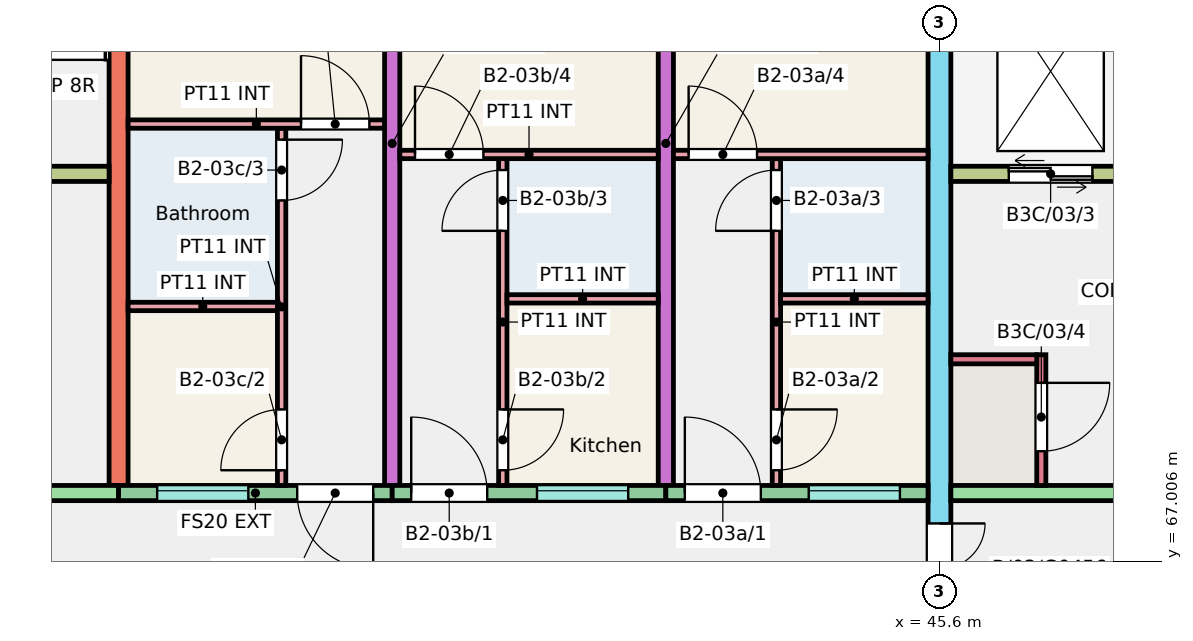
"""IFC4 building model, lengths in metres.
Left out: names, types, materials, properties, quantities, classifications, styles, units other than length and angle.
Written with IfcOpenShell. Run it as: python <this file> out.ifc"""

import sys

from ifc_helpers import new_model, si_unit, direction, frame, frame_2d, origin, place, context, subcontext, project, spatial, rectangle, extrude, element, fill, save


model = new_model("IFC4")
c1 = context("Model", 3, precision=1e-05, world=origin(), true_north=direction((0.0, 1.0)))
c2 = subcontext(c1, "Body", "Model", "MODEL_VIEW")
j1 = project(units=[si_unit("LENGTHUNIT", "METRE"), si_unit("PLANEANGLEUNIT", "RADIAN")], contexts=[c1])
p1 = place(None, origin())
s1 = spatial("IfcSite", under=j1, at=p1, CompositionType="ELEMENT")
p2 = place(p1, origin())
s2 = spatial("IfcBuilding", under=s1, at=p2, CompositionType="ELEMENT")
p3 = place(p2, frame((0.0, 0.0, 9.0)))
s3 = spatial("IfcBuildingStorey", under=s2, at=p3, CompositionType="ELEMENT", Elevation=9.0)
p4 = place(p3, frame((34.8, 68.0, 0.0), z_axis=(0.0, 0.0, 1.0), x_axis=(0.0, 1.0, 0.0)))
e1 = element("IfcWall", 1, at=p4, inside=s3, PredefinedType="SHEAR", context=c2, shape_type="SweptSolid", body=[
    extrude(rectangle(XDim=9.0, YDim=0.25, at=frame_2d((4.5, 0.0))), origin(), (0.0, 0.0, 1.0), 3.0),
])
for number, where, z_axis, x_axis in (
    (2, (38.4, 68.0, 0.0), (0.0, 0.0, 1.0), (0.0, 1.0, 0.0)),
    (3, (42.0, 68.0, 0.0), (0.0, 0.0, 1.0), (0.0, 1.0, 0.0)),
):
    element("IfcWall", number, at=place(p3, frame(where, z_axis=z_axis, x_axis=x_axis)), inside=s3, PredefinedType="SHEAR", context=c2, shape_type="SweptSolid", body=[
        extrude(rectangle(XDim=9.0, YDim=0.2, at=frame_2d((4.5, 0.0))), origin(), (0.0, 0.0, 1.0), 3.0),
    ])
p5 = place(p3, frame((45.6, 66.0, 0.0), z_axis=(0.0, 0.0, 1.0), x_axis=(0.0, 1.0, 0.0)))
e4 = element("IfcWall", 4, at=p5, inside=s3, PredefinedType="SHEAR", context=c2, shape_type="SweptSolid", body=[
    extrude(rectangle(XDim=11.0, YDim=0.3, at=frame_2d((5.5, 0.0))), origin(), (0.0, 0.0, 1.0), 3.0),
])
p6 = place(p5, frame((0.3, 0.0, 0.0)))
e5 = element("IfcOpeningElement", 5, at=p6, cuts=e4, PredefinedType="OPENING", context=c2, shape_type="SweptSolid", body=[
    extrude(rectangle(XDim=1.2, YDim=2.1, at=frame_2d((0.6, 1.05))), frame((0.0, 0.16, 0.0), z_axis=(0.0, -1.0, 0.0), x_axis=(1.0, 0.0, 0.0)), (0.0, 0.0, 1.0), 0.32),
])
p7 = place(p3, frame((28.95, 67.9, 0.0), z_axis=(0.0, 0.0, 1.0), x_axis=(1.0, 0.0, 0.0)))
e6 = element("IfcWall", 6, at=p7, inside=s3, PredefinedType="SHEAR", context=c2, shape_type="SweptSolid", body=[
    extrude(rectangle(XDim=5.85, YDim=0.2, at=frame_2d((2.925, 0.0))), origin(), (0.0, 0.0, 1.0), 3.0),
])
p8 = place(p7, frame((2.312, 0.0, 0.0)))
e7 = element("IfcOpeningElement", 7, at=p8, cuts=e6, PredefinedType="OPENING", context=c2, shape_type="SweptSolid", body=[
    extrude(rectangle(XDim=1.1, YDim=2.1, at=frame_2d((0.55, 1.05))), frame((0.0, 0.11, 0.0), z_axis=(0.0, -1.0, 0.0), x_axis=(1.0, 0.0, 0.0)), (0.0, 0.0, 1.0), 0.22),
])
p9 = place(p3, frame((28.95, 72.1, 0.0), z_axis=(0.0, 0.0, 1.0), x_axis=(1.0, 0.0, 0.0)))
e8 = element("IfcWall", 8, at=p9, inside=s3, PredefinedType="SHEAR", context=c2, shape_type="SweptSolid", body=[
    extrude(rectangle(XDim=5.725, YDim=0.2, at=frame_2d((2.863, 0.0))), origin(), (0.0, 0.0, 1.0), 3.0),
])
p10 = place(p9, frame((3.775, 0.0, 0.0)))
e9 = element("IfcOpeningElement", 9, at=p10, cuts=e8, PredefinedType="OPENING", context=c2, shape_type="SweptSolid", body=[
    extrude(rectangle(XDim=1.0, YDim=2.1, at=frame_2d((0.5, 1.05))), frame((0.0, 0.11, 0.0), z_axis=(0.0, -1.0, 0.0), x_axis=(1.0, 0.0, 0.0)), (0.0, 0.0, 1.0), 0.22),
])
p11 = place(p9, frame((0.762, 0.0, 0.0)))
e10 = element("IfcOpeningElement", 10, at=p11, cuts=e8, PredefinedType="OPENING", context=c2, shape_type="SweptSolid", body=[
    extrude(rectangle(XDim=1.1, YDim=2.1, at=frame_2d((0.55, 1.05))), frame((0.0, 0.11, 0.0), z_axis=(0.0, -1.0, 0.0), x_axis=(1.0, 0.0, 0.0)), (0.0, 0.0, 1.0), 0.22),
])
p12 = place(p3, frame((34.8, 67.9, 0.0), z_axis=(0.0, 0.0, 1.0), x_axis=(1.0, 0.0, 0.0)))
e11 = element("IfcWall", 11, at=p12, inside=s3, PredefinedType="SOLIDWALL", context=c2, shape_type="SweptSolid", body=[
    extrude(rectangle(XDim=3.6, YDim=0.2, at=frame_2d((1.8, 0.0))), origin(), (0.0, 0.0, 1.0), 3.0),
])
p13 = place(p12, frame((0.508, 0.0, 1.1)))
e12 = element("IfcOpeningElement", 12, at=p13, cuts=e11, PredefinedType="OPENING", context=c2, shape_type="SweptSolid", body=[
    extrude(rectangle(XDim=1.2, YDim=1.3, at=frame_2d((0.6, 0.65))), frame((0.0, 0.11, 0.0), z_axis=(0.0, -1.0, 0.0), x_axis=(1.0, 0.0, 0.0)), (0.0, 0.0, 1.0), 0.22),
])
p14 = place(p12, frame((2.35, 0.0, 0.0)))
e13 = element("IfcOpeningElement", 13, at=p14, cuts=e11, PredefinedType="OPENING", context=c2, shape_type="SweptSolid", body=[
    extrude(rectangle(XDim=1.0, YDim=2.1, at=frame_2d((0.5, 1.05))), frame((0.0, 0.11, 0.0), z_axis=(0.0, -1.0, 0.0), x_axis=(1.0, 0.0, 0.0)), (0.0, 0.0, 1.0), 0.22),
])
p15 = place(p3, frame((38.4, 67.9, 0.0), z_axis=(0.0, 0.0, 1.0), x_axis=(1.0, 0.0, 0.0)))
e14 = element("IfcWall", 14, at=p15, inside=s3, PredefinedType="SOLIDWALL", context=c2, shape_type="SweptSolid", body=[
    extrude(rectangle(XDim=3.6, YDim=0.2, at=frame_2d((1.8, 0.0))), origin(), (0.0, 0.0, 1.0), 3.0),
])
p16 = place(p15, frame((1.905, 0.0, 1.1)))
e15 = element("IfcOpeningElement", 15, at=p16, cuts=e14, PredefinedType="OPENING", context=c2, shape_type="SweptSolid", body=[
    extrude(rectangle(XDim=1.2, YDim=1.3, at=frame_2d((0.6, 0.65))), frame((0.0, 0.11, 0.0), z_axis=(0.0, -1.0, 0.0), x_axis=(1.0, 0.0, 0.0)), (0.0, 0.0, 1.0), 0.22),
])
p17 = place(p15, frame((0.25, 0.0, 0.0)))
e16 = element("IfcOpeningElement", 16, at=p17, cuts=e14, PredefinedType="OPENING", context=c2, shape_type="SweptSolid", body=[
    extrude(rectangle(XDim=1.0, YDim=2.1, at=frame_2d((0.5, 1.05))), frame((0.0, 0.11, 0.0), z_axis=(0.0, -1.0, 0.0), x_axis=(1.0, 0.0, 0.0)), (0.0, 0.0, 1.0), 0.22),
])
p18 = place(p3, frame((42.0, 67.9, 0.0), z_axis=(0.0, 0.0, 1.0), x_axis=(1.0, 0.0, 0.0)))
e17 = element("IfcWall", 17, at=p18, inside=s3, PredefinedType="SOLIDWALL", context=c2, shape_type="SweptSolid", body=[
    extrude(rectangle(XDim=3.45, YDim=0.2, at=frame_2d((1.725, 0.0))), origin(), (0.0, 0.0, 1.0), 3.0),
])
p19 = place(p18, frame((1.88, 0.0, 1.1)))
e18 = element("IfcOpeningElement", 18, at=p19, cuts=e17, PredefinedType="OPENING", context=c2, shape_type="SweptSolid", body=[
    extrude(rectangle(XDim=1.2, YDim=1.3, at=frame_2d((0.6, 0.65))), frame((0.0, 0.11, 0.0), z_axis=(0.0, -1.0, 0.0), x_axis=(1.0, 0.0, 0.0)), (0.0, 0.0, 1.0), 0.22),
])
p20 = place(p18, frame((0.25, 0.0, 0.0)))
e19 = element("IfcOpeningElement", 19, at=p20, cuts=e17, PredefinedType="OPENING", context=c2, shape_type="SweptSolid", body=[
    extrude(rectangle(XDim=1.0, YDim=2.1, at=frame_2d((0.5, 1.05))), frame((0.0, 0.11, 0.0), z_axis=(0.0, -1.0, 0.0), x_axis=(1.0, 0.0, 0.0)), (0.0, 0.0, 1.0), 0.22),
])
p21 = place(p3, frame((45.75, 67.9, 0.0), z_axis=(0.0, 0.0, 1.0), x_axis=(1.0, 0.0, 0.0)))
e20 = element("IfcWall", 20, at=p21, inside=s3, PredefinedType="SHEAR", context=c2, shape_type="SweptSolid", body=[
    extrude(rectangle(XDim=5.85, YDim=0.2, at=frame_2d((2.925, 0.0))), origin(), (0.0, 0.0, 1.0), 3.0),
])
p22 = place(p21, frame((2.312, 0.0, 0.0)))
e21 = element("IfcOpeningElement", 21, at=p22, cuts=e20, PredefinedType="OPENING", context=c2, shape_type="SweptSolid", body=[
    extrude(rectangle(XDim=1.1, YDim=2.1, at=frame_2d((0.55, 1.05))), frame((0.0, 0.11, 0.0), z_axis=(0.0, -1.0, 0.0), x_axis=(1.0, 0.0, 0.0)), (0.0, 0.0, 1.0), 0.22),
])
p23 = place(p3, frame((45.75, 72.1, 0.0), z_axis=(0.0, 0.0, 1.0), x_axis=(1.0, 0.0, 0.0)))
e22 = element("IfcWall", 22, at=p23, inside=s3, PredefinedType="SHEAR", context=c2, shape_type="SweptSolid", body=[
    extrude(rectangle(XDim=5.725, YDim=0.2, at=frame_2d((2.863, 0.0))), origin(), (0.0, 0.0, 1.0), 3.0),
])
p24 = place(p23, frame((3.775, 0.0, 0.0)))
e23 = element("IfcOpeningElement", 23, at=p24, cuts=e22, PredefinedType="OPENING", context=c2, shape_type="SweptSolid", body=[
    extrude(rectangle(XDim=1.0, YDim=2.1, at=frame_2d((0.5, 1.05))), frame((0.0, 0.11, 0.0), z_axis=(0.0, -1.0, 0.0), x_axis=(1.0, 0.0, 0.0)), (0.0, 0.0, 1.0), 0.22),
])
p25 = place(p23, frame((0.762, 0.0, 0.0)))
e24 = element("IfcOpeningElement", 24, at=p25, cuts=e22, PredefinedType="OPENING", context=c2, shape_type="SweptSolid", body=[
    extrude(rectangle(XDim=1.1, YDim=2.1, at=frame_2d((0.55, 1.05))), frame((0.0, 0.11, 0.0), z_axis=(0.0, -1.0, 0.0), x_axis=(1.0, 0.0, 0.0)), (0.0, 0.0, 1.0), 0.22),
])
p26 = place(p3, frame((46.94, 68.0, 0.0), z_axis=(0.0, 0.0, 1.0), x_axis=(0.0, 1.0, 0.0)))
e25 = element("IfcWall", 25, at=p26, inside=s3, PredefinedType="SHEAR", context=c2, shape_type="SweptSolid", body=[
    extrude(rectangle(XDim=1.72, YDim=0.12, at=frame_2d((0.86, 0.0))), origin(), (0.0, 0.0, 1.0), 3.0),
])
p27 = place(p26, frame((0.45, 0.0, 0.0)))
e26 = element("IfcOpeningElement", 26, at=p27, cuts=e25, PredefinedType="OPENING", context=c2, shape_type="SweptSolid", body=[
    extrude(rectangle(XDim=0.9, YDim=2.1, at=frame_2d((0.45, 1.05))), frame((0.0, 0.07, 0.0), z_axis=(0.0, -1.0, 0.0), x_axis=(1.0, 0.0, 0.0)), (0.0, 0.0, 1.0), 0.14),
])
p28 = place(p3, frame((45.75, 69.66, 0.0), z_axis=(0.0, 0.0, 1.0), x_axis=(1.0, 0.0, 0.0)))
e27 = element("IfcWall", 27, at=p28, inside=s3, PredefinedType="SHEAR", context=c2, shape_type="SweptSolid", body=[
    extrude(rectangle(XDim=1.13, YDim=0.12, at=frame_2d((0.565, 0.0))), origin(), (0.0, 0.0, 1.0), 3.0),
])
p29 = place(p3, frame((43.455, 68.0, 0.0), z_axis=(0.0, 0.0, 1.0), x_axis=(0.0, 1.0, 0.0)))
e28 = element("IfcWall", 28, at=p29, inside=s3, PredefinedType="PARTITIONING", context=c2, shape_type="SweptSolid", body=[
    extrude(rectangle(XDim=4.3, YDim=0.11, at=frame_2d((2.15, 0.0))), origin(), (0.0, 0.0, 1.0), 2.8),
])
p30 = place(p29, frame((0.2, 0.0, 0.0)))
e29 = element("IfcOpeningElement", 29, at=p30, cuts=e28, PredefinedType="OPENING", context=c2, shape_type="SweptSolid", body=[
    extrude(rectangle(XDim=0.8, YDim=2.1, at=frame_2d((0.4, 1.05))), frame((0.0, 0.065, 0.0), z_axis=(0.0, -1.0, 0.0), x_axis=(1.0, 0.0, 0.0)), (0.0, 0.0, 1.0), 0.13),
])
p31 = place(p29, frame((3.35, 0.0, 0.0)))
e30 = element("IfcOpeningElement", 30, at=p31, cuts=e28, PredefinedType="OPENING", context=c2, shape_type="SweptSolid", body=[
    extrude(rectangle(XDim=0.8, YDim=2.1, at=frame_2d((0.4, 1.05))), frame((0.0, 0.065, 0.0), z_axis=(0.0, -1.0, 0.0), x_axis=(1.0, 0.0, 0.0)), (0.0, 0.0, 1.0), 0.13),
])
p32 = place(p3, frame((43.51, 70.455, 0.0), z_axis=(0.0, 0.0, 1.0), x_axis=(1.0, 0.0, 0.0)))
e31 = element("IfcWall", 31, at=p32, inside=s3, PredefinedType="PARTITIONING", context=c2, shape_type="SweptSolid", body=[
    extrude(rectangle(XDim=1.94, YDim=0.11, at=frame_2d((0.97, 0.0))), origin(), (0.0, 0.0, 1.0), 2.8),
])
p33 = place(p3, frame((42.1, 72.355, 0.0), z_axis=(0.0, 0.0, 1.0), x_axis=(1.0, 0.0, 0.0)))
e32 = element("IfcWall", 32, at=p33, inside=s3, PredefinedType="PARTITIONING", context=c2, shape_type="SweptSolid", body=[
    extrude(rectangle(XDim=3.35, YDim=0.11, at=frame_2d((1.675, 0.0))), origin(), (0.0, 0.0, 1.0), 2.8),
])
p34 = place(p33, frame((0.2, 0.0, 0.0)))
e33 = element("IfcOpeningElement", 33, at=p34, cuts=e32, PredefinedType="OPENING", context=c2, shape_type="SweptSolid", body=[
    extrude(rectangle(XDim=0.9, YDim=2.1, at=frame_2d((0.45, 1.05))), frame((0.0, 0.065, 0.0), z_axis=(0.0, -1.0, 0.0), x_axis=(1.0, 0.0, 0.0)), (0.0, 0.0, 1.0), 0.13),
])
p35 = place(p3, frame((39.855, 68.0, 0.0), z_axis=(0.0, 0.0, 1.0), x_axis=(0.0, 1.0, 0.0)))
e34 = element("IfcWall", 34, at=p35, inside=s3, PredefinedType="PARTITIONING", context=c2, shape_type="SweptSolid", body=[
    extrude(rectangle(XDim=4.3, YDim=0.11, at=frame_2d((2.15, 0.0))), origin(), (0.0, 0.0, 1.0), 2.8),
])
p36 = place(p35, frame((0.2, 0.0, 0.0)))
e35 = element("IfcOpeningElement", 35, at=p36, cuts=e34, PredefinedType="OPENING", context=c2, shape_type="SweptSolid", body=[
    extrude(rectangle(XDim=0.8, YDim=2.1, at=frame_2d((0.4, 1.05))), frame((0.0, 0.065, 0.0), z_axis=(0.0, -1.0, 0.0), x_axis=(1.0, 0.0, 0.0)), (0.0, 0.0, 1.0), 0.13),
])
p37 = place(p35, frame((3.35, 0.0, 0.0)))
e36 = element("IfcOpeningElement", 36, at=p37, cuts=e34, PredefinedType="OPENING", context=c2, shape_type="SweptSolid", body=[
    extrude(rectangle(XDim=0.8, YDim=2.1, at=frame_2d((0.4, 1.05))), frame((0.0, 0.065, 0.0), z_axis=(0.0, -1.0, 0.0), x_axis=(1.0, 0.0, 0.0)), (0.0, 0.0, 1.0), 0.13),
])
p38 = place(p3, frame((39.91, 70.455, 0.0), z_axis=(0.0, 0.0, 1.0), x_axis=(1.0, 0.0, 0.0)))
e37 = element("IfcWall", 37, at=p38, inside=s3, PredefinedType="PARTITIONING", context=c2, shape_type="SweptSolid", body=[
    extrude(rectangle(XDim=1.99, YDim=0.11, at=frame_2d((0.995, 0.0))), origin(), (0.0, 0.0, 1.0), 2.8),
])
p39 = place(p3, frame((38.5, 72.355, 0.0), z_axis=(0.0, 0.0, 1.0), x_axis=(1.0, 0.0, 0.0)))
e38 = element("IfcWall", 38, at=p39, inside=s3, PredefinedType="PARTITIONING", context=c2, shape_type="SweptSolid", body=[
    extrude(rectangle(XDim=3.4, YDim=0.11, at=frame_2d((1.7, 0.0))), origin(), (0.0, 0.0, 1.0), 2.8),
])
p40 = place(p39, frame((0.2, 0.0, 0.0)))
e39 = element("IfcOpeningElement", 39, at=p40, cuts=e38, PredefinedType="OPENING", context=c2, shape_type="SweptSolid", body=[
    extrude(rectangle(XDim=0.9, YDim=2.1, at=frame_2d((0.45, 1.05))), frame((0.0, 0.065, 0.0), z_axis=(0.0, -1.0, 0.0), x_axis=(1.0, 0.0, 0.0)), (0.0, 0.0, 1.0), 0.13),
])
p41 = place(p3, frame((34.925, 70.355, 0.0), z_axis=(0.0, 0.0, 1.0), x_axis=(1.0, 0.0, 0.0)))
e40 = element("IfcWall", 40, at=p41, inside=s3, PredefinedType="PARTITIONING", context=c2, shape_type="SweptSolid", body=[
    extrude(rectangle(XDim=1.965, YDim=0.11, at=frame_2d((0.982, 0.0))), origin(), (0.0, 0.0, 1.0), 2.8),
])
p42 = place(p3, frame((36.945, 68.0, 0.0), z_axis=(0.0, 0.0, 1.0), x_axis=(0.0, 1.0, 0.0)))
e41 = element("IfcWall", 41, at=p42, inside=s3, PredefinedType="PARTITIONING", context=c2, shape_type="SweptSolid", body=[
    extrude(rectangle(XDim=4.7, YDim=0.11, at=frame_2d((2.35, 0.0))), origin(), (0.0, 0.0, 1.0), 2.8),
])
p43 = place(p42, frame((0.2, 0.0, 0.0)))
e42 = element("IfcOpeningElement", 42, at=p43, cuts=e41, PredefinedType="OPENING", context=c2, shape_type="SweptSolid", body=[
    extrude(rectangle(XDim=0.8, YDim=2.1, at=frame_2d((0.4, 1.05))), frame((0.0, 0.065, 0.0), z_axis=(0.0, -1.0, 0.0), x_axis=(1.0, 0.0, 0.0)), (0.0, 0.0, 1.0), 0.13),
])
p44 = place(p42, frame((3.75, 0.0, 0.0)))
e43 = element("IfcOpeningElement", 43, at=p44, cuts=e41, PredefinedType="OPENING", context=c2, shape_type="SweptSolid", body=[
    extrude(rectangle(XDim=0.8, YDim=2.1, at=frame_2d((0.4, 1.05))), frame((0.0, 0.065, 0.0), z_axis=(0.0, -1.0, 0.0), x_axis=(1.0, 0.0, 0.0)), (0.0, 0.0, 1.0), 0.13),
])
p45 = place(p3, frame((34.925, 72.755, 0.0), z_axis=(0.0, 0.0, 1.0), x_axis=(1.0, 0.0, 0.0)))
e44 = element("IfcWall", 44, at=p45, inside=s3, PredefinedType="PARTITIONING", context=c2, shape_type="SweptSolid", body=[
    extrude(rectangle(XDim=3.375, YDim=0.11, at=frame_2d((1.688, 0.0))), origin(), (0.0, 0.0, 1.0), 2.8),
])
p46 = place(p45, frame((2.275, 0.0, 0.0)))
e45 = element("IfcOpeningElement", 45, at=p46, cuts=e44, PredefinedType="OPENING", context=c2, shape_type="SweptSolid", body=[
    extrude(rectangle(XDim=0.9, YDim=2.1, at=frame_2d((0.45, 1.05))), frame((0.0, 0.065, 0.0), z_axis=(0.0, -1.0, 0.0), x_axis=(1.0, 0.0, 0.0)), (0.0, 0.0, 1.0), 0.13),
])
p47 = place(p19, origin())
e46 = element("IfcWindow", 46, at=p47, inside=s3, PartitioningType="SINGLE_PANEL", PredefinedType="WINDOW", context=c2, shape_type="SweptSolid", body=[
    extrude(rectangle(XDim=1.2, YDim=1.3, at=frame_2d((0.6, 0.65))), frame((0.0, 0.06, 0.0), z_axis=(0.0, -1.0, 0.0), x_axis=(1.0, 0.0, 0.0)), (0.0, 0.0, 1.0), 0.06),
])
fill(e18, e46)
p48 = place(p16, origin())
e47 = element("IfcWindow", 47, at=p48, inside=s3, PartitioningType="SINGLE_PANEL", PredefinedType="WINDOW", context=c2, shape_type="SweptSolid", body=[
    extrude(rectangle(XDim=1.2, YDim=1.3, at=frame_2d((0.6, 0.65))), frame((0.0, 0.06, 0.0), z_axis=(0.0, -1.0, 0.0), x_axis=(1.0, 0.0, 0.0)), (0.0, 0.0, 1.0), 0.06),
])
fill(e15, e47)
p49 = place(p13, origin())
e48 = element("IfcWindow", 48, at=p49, inside=s3, PartitioningType="SINGLE_PANEL", PredefinedType="WINDOW", context=c2, shape_type="SweptSolid", body=[
    extrude(rectangle(XDim=1.2, YDim=1.3, at=frame_2d((0.6, 0.65))), frame((0.0, 0.06, 0.0), z_axis=(0.0, -1.0, 0.0), x_axis=(1.0, 0.0, 0.0)), (0.0, 0.0, 1.0), 0.06),
])
fill(e12, e48)
p50 = place(p20, origin())
e49 = element("IfcDoor", 49, at=p50, inside=s3, OperationType="SINGLE_SWING_LEFT", PredefinedType="DOOR", context=c2, shape_type="SweptSolid", body=[
    extrude(rectangle(XDim=1.0, YDim=2.1, at=frame_2d((0.5, 1.05))), frame((0.0, 0.025, 0.0), z_axis=(0.0, -1.0, 0.0), x_axis=(1.0, 0.0, 0.0)), (0.0, 0.0, 1.0), 0.05),
])
fill(e19, e49)
p51 = place(p30, origin())
e50 = element("IfcDoor", 50, at=p51, inside=s3, OperationType="SINGLE_SWING_RIGHT", PredefinedType="DOOR", context=c2, shape_type="SweptSolid", body=[
    extrude(rectangle(XDim=0.8, YDim=2.1, at=frame_2d((0.4, 1.05))), frame((0.0, 0.025, 0.0), z_axis=(0.0, -1.0, 0.0), x_axis=(1.0, 0.0, 0.0)), (0.0, 0.0, 1.0), 0.05),
])
fill(e29, e50)
p52 = place(p31, origin())
e51 = element("IfcDoor", 51, at=p52, inside=s3, OperationType="SINGLE_SWING_LEFT", PredefinedType="DOOR", context=c2, shape_type="SweptSolid", body=[
    extrude(rectangle(XDim=0.8, YDim=2.1, at=frame_2d((0.4, 1.05))), frame((0.0, 0.025, 0.0), z_axis=(0.0, -1.0, 0.0), x_axis=(1.0, 0.0, 0.0)), (0.0, 0.0, 1.0), 0.05),
])
fill(e30, e51)
p53 = place(p34, origin())
e52 = element("IfcDoor", 52, at=p53, inside=s3, OperationType="SINGLE_SWING_LEFT", PredefinedType="DOOR", context=c2, shape_type="SweptSolid", body=[
    extrude(rectangle(XDim=0.9, YDim=2.1, at=frame_2d((0.45, 1.05))), frame((0.0, 0.025, 0.0), z_axis=(0.0, -1.0, 0.0), x_axis=(1.0, 0.0, 0.0)), (0.0, 0.0, 1.0), 0.05),
])
fill(e33, e52)
p54 = place(p17, origin())
e53 = element("IfcDoor", 53, at=p54, inside=s3, OperationType="SINGLE_SWING_LEFT", PredefinedType="DOOR", context=c2, shape_type="SweptSolid", body=[
    extrude(rectangle(XDim=1.0, YDim=2.1, at=frame_2d((0.5, 1.05))), frame((0.0, 0.025, 0.0), z_axis=(0.0, -1.0, 0.0), x_axis=(1.0, 0.0, 0.0)), (0.0, 0.0, 1.0), 0.05),
])
fill(e16, e53)
p55 = place(p36, origin())
e54 = element("IfcDoor", 54, at=p55, inside=s3, OperationType="SINGLE_SWING_RIGHT", PredefinedType="DOOR", context=c2, shape_type="SweptSolid", body=[
    extrude(rectangle(XDim=0.8, YDim=2.1, at=frame_2d((0.4, 1.05))), frame((0.0, 0.025, 0.0), z_axis=(0.0, -1.0, 0.0), x_axis=(1.0, 0.0, 0.0)), (0.0, 0.0, 1.0), 0.05),
])
fill(e35, e54)
p56 = place(p37, origin())
e55 = element("IfcDoor", 55, at=p56, inside=s3, OperationType="SINGLE_SWING_LEFT", PredefinedType="DOOR", context=c2, shape_type="SweptSolid", body=[
    extrude(rectangle(XDim=0.8, YDim=2.1, at=frame_2d((0.4, 1.05))), frame((0.0, 0.025, 0.0), z_axis=(0.0, -1.0, 0.0), x_axis=(1.0, 0.0, 0.0)), (0.0, 0.0, 1.0), 0.05),
])
fill(e36, e55)
p57 = place(p40, origin())
e56 = element("IfcDoor", 56, at=p57, inside=s3, OperationType="SINGLE_SWING_LEFT", PredefinedType="DOOR", context=c2, shape_type="SweptSolid", body=[
    extrude(rectangle(XDim=0.9, YDim=2.1, at=frame_2d((0.45, 1.05))), frame((0.0, 0.025, 0.0), z_axis=(0.0, -1.0, 0.0), x_axis=(1.0, 0.0, 0.0)), (0.0, 0.0, 1.0), 0.05),
])
fill(e39, e56)
p58 = place(p14, origin())
e57 = element("IfcDoor", 57, at=p58, inside=s3, OperationType="SINGLE_SWING_RIGHT", PredefinedType="DOOR", context=c2, shape_type="SweptSolid", body=[
    extrude(rectangle(XDim=1.0, YDim=2.1, at=frame_2d((0.5, 1.05))), frame((0.0, 0.025, 0.0), z_axis=(0.0, -1.0, 0.0), x_axis=(1.0, 0.0, 0.0)), (0.0, 0.0, 1.0), 0.05),
])
fill(e13, e57)
p59 = place(p43, origin())
e58 = element("IfcDoor", 58, at=p59, inside=s3, OperationType="SINGLE_SWING_LEFT", PredefinedType="DOOR", context=c2, shape_type="SweptSolid", body=[
    extrude(rectangle(XDim=0.8, YDim=2.1, at=frame_2d((0.4, 1.05))), frame((0.0, 0.025, 0.0), z_axis=(0.0, -1.0, 0.0), x_axis=(1.0, 0.0, 0.0)), (0.0, 0.0, 1.0), 0.05),
])
fill(e42, e58)
p60 = place(p44, origin())
e59 = element("IfcDoor", 59, at=p60, inside=s3, OperationType="SINGLE_SWING_RIGHT", PredefinedType="DOOR", context=c2, shape_type="SweptSolid", body=[
    extrude(rectangle(XDim=0.8, YDim=2.1, at=frame_2d((0.4, 1.05))), frame((0.0, 0.025, 0.0), z_axis=(0.0, -1.0, 0.0), x_axis=(1.0, 0.0, 0.0)), (0.0, 0.0, 1.0), 0.05),
])
fill(e43, e59)
p61 = place(p46, origin())
e60 = element("IfcDoor", 60, at=p61, inside=s3, OperationType="SINGLE_SWING_LEFT", PredefinedType="DOOR", context=c2, shape_type="SweptSolid", body=[
    extrude(rectangle(XDim=0.9, YDim=2.1, at=frame_2d((0.45, 1.05))), frame((0.0, 0.025, 0.0), z_axis=(0.0, -1.0, 0.0), x_axis=(1.0, 0.0, 0.0)), (0.0, 0.0, 1.0), 0.05),
])
fill(e45, e60)
p62 = place(p25, origin())
e61 = element("IfcDoor", 61, at=p62, inside=s3, OperationType="DOUBLE_DOOR_SLIDING", PredefinedType="DOOR", context=c2, shape_type="SweptSolid", body=[
    extrude(rectangle(XDim=1.1, YDim=2.1, at=frame_2d((0.55, 1.05))), frame((0.0, 0.025, 0.0), z_axis=(0.0, -1.0, 0.0), x_axis=(1.0, 0.0, 0.0)), (0.0, 0.0, 1.0), 0.05),
])
fill(e24, e61)
p63 = place(p27, origin())
e62 = element("IfcDoor", 62, at=p63, inside=s3, OperationType="SINGLE_SWING_RIGHT", PredefinedType="DOOR", context=c2, shape_type="SweptSolid", body=[
    extrude(rectangle(XDim=0.9, YDim=2.1, at=frame_2d((0.45, 1.05))), frame((0.0, 0.025, 0.0), z_axis=(0.0, -1.0, 0.0), x_axis=(1.0, 0.0, 0.0)), (0.0, 0.0, 1.0), 0.05),
])
fill(e26, e62)
p64 = place(p6, origin())
e63 = element("IfcDoor", 63, at=p64, inside=s3, OperationType="DOUBLE_DOOR_SINGLE_SWING", PredefinedType="DOOR", context=c2, shape_type="SweptSolid", body=[
    extrude(rectangle(XDim=1.2, YDim=2.1, at=frame_2d((0.6, 1.05))), frame((0.0, 0.025, 0.0), z_axis=(0.0, -1.0, 0.0), x_axis=(1.0, 0.0, 0.0)), (0.0, 0.0, 1.0), 0.05),
])
fill(e5, e63)
save(model, sys.argv[1])
